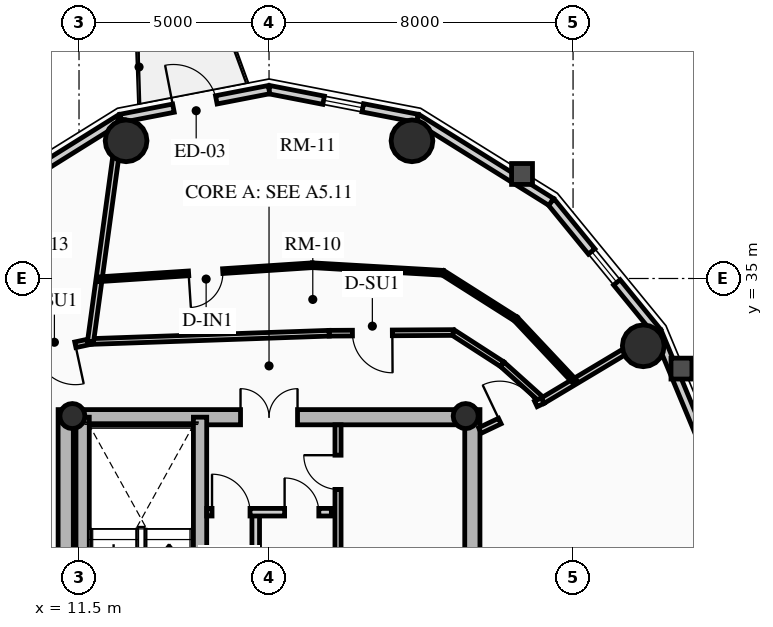
"""IFC4 building model, lengths in metres.
Left out: names, types, materials, properties, quantities, classifications, styles, units other than length and angle.
Written with IfcOpenShell. Run it as: python <this file> out.ifc"""

import sys

from ifc_helpers import new_model, si_unit, direction, frame, frame_2d, origin, origin_2d, place, context, subcontext, project, spatial, rectangle, circle, hollow_circle, extrude, source, transform, mapped, element, fill, save


model = new_model("IFC4")
c1 = context("Model", 3, precision=1e-05, world=origin(), true_north=direction((0.0, 1.0)))
c2 = subcontext(c1, "Body", "Model", "MODEL_VIEW")
j1 = project(units=[si_unit("LENGTHUNIT", "METRE"), si_unit("PLANEANGLEUNIT", "RADIAN")], contexts=[c1])
p1 = place(None, origin())
s1 = spatial("IfcSite", under=j1, at=p1, CompositionType="ELEMENT")
p2 = place(p1, origin())
s2 = spatial("IfcBuilding", under=s1, at=p2, CompositionType="ELEMENT")
p3 = place(p2, frame((0.0, 0.0, 217.03)))
s3 = spatial("IfcBuildingStorey", under=s2, at=p3, CompositionType="ELEMENT", Elevation=217.03)
for number, where, z_axis, x_axis in (
    (1, (11.15, 17.45, 0.0), (0.0, 0.0, 1.0), (0.0, 1.0, 0.0)),
    (2, (21.85, 17.45, 0.0), (0.0, 0.0, 1.0), (0.0, 1.0, 0.0)),
):
    element("IfcWall", number, at=place(p3, frame(where, z_axis=z_axis, x_axis=x_axis)), inside=s3, PredefinedType="SHEAR", context=c2, shape_type="SweptSolid", body=[
        extrude(rectangle(XDim=14.1, YDim=0.4, at=frame_2d((7.05, 0.0))), origin(), (0.0, 0.0, 1.0), 2.91),
    ])
p4 = place(p3, frame((11.15, 31.35, 0.0), z_axis=(0.0, 0.0, 1.0), x_axis=(1.0, 0.0, 0.0)))
e3 = element("IfcWall", 3, at=p4, inside=s3, PredefinedType="SHEAR", context=c2, shape_type="SweptSolid", body=[
    extrude(rectangle(XDim=10.7, YDim=0.4, at=frame_2d((5.35, 0.0))), origin(), (0.0, 0.0, 1.0), 2.91),
])
m1 = source(origin(), c2, "Body", "SweptSolid", [
    extrude(rectangle(XDim=1.5, YDim=2.02, at=frame_2d((0.75, 1.01))), frame((0.0, 0.21, 0.0), z_axis=(0.0, -1.0, 0.0), x_axis=(1.0, 0.0, 0.0)), (0.0, 0.0, 1.0), 0.42),
])
p5 = place(p4, frame((4.6, 0.0, 0.0)))
e4 = element("IfcOpeningElement", 4, at=p5, cuts=e3, PredefinedType="OPENING", context=c2, shape_type="MappedRepresentation", body=[
    mapped(m1, transform((0.0, 0.0, 0.0), x_axis=(1.0, 0.0, 0.0), y_axis=(0.0, 1.0, 0.0), z_axis=(0.0, 0.0, 1.0), scale=1.0)),
])
p6 = place(p3, frame((14.685, 17.65, 0.0), z_axis=(0.0, 0.0, 1.0), x_axis=(0.0, 1.0, 0.0)))
e5 = element("IfcWall", 5, at=p6, inside=s3, PredefinedType="SHEAR", context=c2, shape_type="SweptSolid", body=[
    extrude(rectangle(XDim=13.7, YDim=0.35, at=frame_2d((6.85, 0.0))), origin(), (0.0, 0.0, 1.0), 2.91),
])
m2 = source(origin(), c2, "Body", "SweptSolid", [
    extrude(rectangle(XDim=1.1, YDim=2.015, at=frame_2d((0.55, 1.007))), frame((0.0, 0.185, 0.0), z_axis=(0.0, -1.0, 0.0), x_axis=(1.0, 0.0, 0.0)), (0.0, 0.0, 1.0), 0.37),
])
p7 = place(p6, frame((4.85, 0.0, 0.0)))
e6 = element("IfcOpeningElement", 6, at=p7, cuts=e5, PredefinedType="OPENING", context=c2, shape_type="MappedRepresentation", body=[
    mapped(m2, transform((0.0, 0.0, 0.0), x_axis=(1.0, 0.0, 0.0), y_axis=(0.0, 1.0, 0.0), z_axis=(0.0, 0.0, 1.0), scale=1.0)),
])
p8 = place(p6, frame((0.625, 0.0, 0.0)))
e7 = element("IfcOpeningElement", 7, at=p8, cuts=e5, PredefinedType="OPENING", context=c2, shape_type="MappedRepresentation", body=[
    mapped(m2, transform((0.0, 0.0, 0.0), x_axis=(1.0, 0.0, 0.0), y_axis=(0.0, 1.0, 0.0), z_axis=(0.0, 0.0, 1.0), scale=1.0)),
])
p9 = place(p6, frame((2.625, 0.0, 0.0)))
e8 = element("IfcOpeningElement", 8, at=p9, cuts=e5, PredefinedType="OPENING", context=c2, shape_type="MappedRepresentation", body=[
    mapped(m2, transform((0.0, 0.0, 0.0), x_axis=(1.0, 0.0, 0.0), y_axis=(0.0, 1.0, 0.0), z_axis=(0.0, 0.0, 1.0), scale=1.0)),
])
m3 = source(origin(), c2, "Body", "SweptSolid", [
    extrude(rectangle(XDim=1.15, YDim=2.02, at=frame_2d((0.575, 1.01))), frame((0.0, 0.185, 0.0), z_axis=(0.0, -1.0, 0.0), x_axis=(1.0, 0.0, 0.0)), (0.0, 0.0, 1.0), 0.37),
])
p10 = place(p6, frame((7.27, 0.0, 0.0)))
e9 = element("IfcOpeningElement", 9, at=p10, cuts=e5, PredefinedType="OPENING", context=c2, shape_type="MappedRepresentation", body=[
    mapped(m3, transform((0.0, 0.0, 0.0), x_axis=(1.0, 0.0, 0.0), y_axis=(0.0, 1.0, 0.0), z_axis=(0.0, 0.0, 1.0), scale=1.0)),
])
p11 = place(p3, frame((11.595, 24.655, 0.0), z_axis=(0.0, 0.0, 1.0), x_axis=(0.0, 1.0, 0.0)))
e10 = element("IfcWall", 10, at=p11, inside=s3, PredefinedType="SHEAR", context=c2, shape_type="SweptSolid", body=[
    extrude(rectangle(XDim=6.695, YDim=0.35, at=frame_2d((3.348, 0.0))), origin(), (0.0, 0.0, 1.0), 2.91),
])
for number, where, z_axis, x_axis in (
    (11, (11.325, 31.38, 0.0), (0.0, 0.0, 1.0), (1.0, 0.0, 0.0)),
    (12, (21.675, 31.38, 0.0), (0.0, 0.0, 1.0), (1.0, 0.0, 0.0)),
):
    element("IfcColumn", number, at=place(p3, frame(where, z_axis=z_axis, x_axis=x_axis)), inside=s3, PredefinedType="COLUMN", context=c2, shape_type="SweptSolid", body=[
        extrude(hollow_circle(Radius=0.33, WallThickness=0.025, at=origin_2d()), origin(), (0.0, 0.0, 1.0), 2.91),
    ])
for number, where, z_axis, x_axis in (
    (13, (26.347, 33.229, 0.0), (0.0, 0.0, 1.0), (1.0, 0.0, 0.0)),
    (14, (20.261, 38.623, 0.0), (0.0, 0.0, 1.0), (1.0, 0.0, 0.0)),
    (15, (12.739, 38.623, 0.0), (0.0, 0.0, 1.0), (1.0, 0.0, 0.0)),
):
    element("IfcColumn", number, at=place(p3, frame(where, z_axis=z_axis, x_axis=x_axis)), inside=s3, PredefinedType="USERDEFINED", context=c2, shape_type="SweptSolid", body=[
        extrude(circle(Radius=0.55, at=origin_2d()), origin(), (0.0, 0.0, 1.0), 2.91),
    ])
p12 = place(p3, frame((26.718, 33.593, 0.0), z_axis=(0.0, 0.0, 1.0), x_axis=(0.384036305194, -0.923317993052, 0.0)))
e16 = element("IfcWall", 16, at=p12, inside=s3, PredefinedType="SOLIDWALL", context=c2, shape_type="SweptSolid", body=[
    extrude(rectangle(XDim=4.671, YDim=0.22, at=frame_2d((2.335, 0.0))), origin(), (0.0, 0.0, 1.0), 2.322),
])
p13 = place(p3, frame((23.924, 37.015, 0.0), z_axis=(0.0, 0.0, 1.0), x_axis=(0.632467166636, -0.774587169483, 0.0)))
e17 = element("IfcWall", 17, at=p13, inside=s3, PredefinedType="SOLIDWALL", context=c2, shape_type="SweptSolid", body=[
    extrude(rectangle(XDim=4.418, YDim=0.22, at=frame_2d((2.209, 0.0))), origin(), (0.0, 0.0, 1.0), 2.322),
])
m4 = source(origin(), c2, "Body", "SweptSolid", [
    extrude(rectangle(XDim=1.05, YDim=1.3, at=frame_2d((0.525, 0.65))), frame((0.0, 0.12, 0.0), z_axis=(0.0, -1.0, 0.0), x_axis=(1.0, 0.0, 0.0)), (0.0, 0.0, 1.0), 0.24),
])
p14 = place(p13, frame((1.684, 0.0, 0.65)))
e18 = element("IfcOpeningElement", 18, at=p14, cuts=e17, PredefinedType="OPENING", context=c2, shape_type="MappedRepresentation", body=[
    mapped(m4, transform((0.0, 0.0, 0.0), x_axis=(1.0, 0.0, 0.0), y_axis=(0.0, 1.0, 0.0), z_axis=(0.0, 0.0, 1.0), scale=1.0)),
])
p15 = place(p3, frame((20.403, 39.213, 0.0), z_axis=(0.0, 0.0, 1.0), x_axis=(0.848318713376, -0.529485939886, 0.0)))
e19 = element("IfcWall", 19, at=p15, inside=s3, PredefinedType="SOLIDWALL", context=c2, shape_type="SweptSolid", body=[
    extrude(rectangle(XDim=4.15, YDim=0.22, at=frame_2d((2.075, 0.0))), origin(), (0.0, 0.0, 1.0), 2.322),
])
p16 = place(p3, frame((16.5, 39.97, 0.0), z_axis=(0.0, 0.0, 1.0), x_axis=(0.981700307484, -0.190432419211, 0.0)))
e20 = element("IfcWall", 20, at=p16, inside=s3, PredefinedType="SOLIDWALL", context=c2, shape_type="SweptSolid", body=[
    extrude(rectangle(XDim=3.976, YDim=0.22, at=frame_2d((1.988, 0.0))), origin(), (0.0, 0.0, 1.0), 2.322),
])
p17 = place(p16, frame((1.463, 0.0, 0.65)))
e21 = element("IfcOpeningElement", 21, at=p17, cuts=e20, PredefinedType="OPENING", context=c2, shape_type="MappedRepresentation", body=[
    mapped(m4, transform((0.0, 0.0, 0.0), x_axis=(1.0, 0.0, 0.0), y_axis=(0.0, 1.0, 0.0), z_axis=(0.0, 0.0, 1.0), scale=1.0)),
])
p18 = place(p3, frame((12.597, 39.213, 0.0), z_axis=(0.0, 0.0, 1.0), x_axis=(0.981700307484, 0.190432419211, 0.0)))
e22 = element("IfcWall", 22, at=p18, inside=s3, PredefinedType="SOLIDWALL", context=c2, shape_type="SweptSolid", body=[
    extrude(rectangle(XDim=3.976, YDim=0.22, at=frame_2d((1.988, 0.0))), origin(), (0.0, 0.0, 1.0), 2.322),
])
m5 = source(origin(), c2, "Body", "SweptSolid", [
    extrude(rectangle(XDim=1.15, YDim=2.005, at=frame_2d((0.575, 1.002))), frame((0.0, 0.12, 0.0), z_axis=(0.0, -1.0, 0.0), x_axis=(1.0, 0.0, 0.0)), (0.0, 0.0, 1.0), 0.24),
])
p19 = place(p18, frame((1.413, 0.0, 0.0)))
e23 = element("IfcOpeningElement", 23, at=p19, cuts=e22, PredefinedType="OPENING", context=c2, shape_type="MappedRepresentation", body=[
    mapped(m5, transform((0.0, 0.0, 0.0), x_axis=(1.0, 0.0, 0.0), y_axis=(0.0, 1.0, 0.0), z_axis=(0.0, 0.0, 1.0), scale=1.0)),
])
p20 = place(p3, frame((9.076, 37.015, 0.0), z_axis=(0.0, 0.0, 1.0), x_axis=(0.848318713376, 0.529485939886, 0.0)))
e24 = element("IfcWall", 24, at=p20, inside=s3, PredefinedType="SOLIDWALL", context=c2, shape_type="SweptSolid", body=[
    extrude(rectangle(XDim=4.15, YDim=0.22, at=frame_2d((2.075, 0.0))), origin(), (0.0, 0.0, 1.0), 2.322),
])
p21 = place(p3, frame((16.15, 26.45, 0.0), z_axis=(0.0, 0.0, 1.0), x_axis=(0.0, 1.0, 0.0)))
e25 = element("IfcWall", 25, at=p21, inside=s3, PredefinedType="PARTITIONING", context=c2, shape_type="SweptSolid", body=[
    extrude(rectangle(XDim=2.4, YDim=0.2, at=frame_2d((1.2, 0.0))), origin(), (0.0, 0.0, 1.0), 2.685),
])
p22 = place(p3, frame((14.86, 28.85, 0.0), z_axis=(0.0, 0.0, 1.0), x_axis=(1.0, 0.0, 0.0)))
e26 = element("IfcWall", 26, at=p22, inside=s3, PredefinedType="PARTITIONING", context=c2, shape_type="SweptSolid", body=[
    extrude(rectangle(XDim=3.28, YDim=0.2, at=frame_2d((1.64, 0.0))), origin(), (0.0, 0.0, 1.0), 2.685),
])
m6 = source(origin(), c2, "Body", "SweptSolid", [
    extrude(rectangle(XDim=1.0, YDim=2.015, at=frame_2d((0.5, 1.007))), frame((0.0, 0.11, 0.0), z_axis=(0.0, -1.0, 0.0), x_axis=(1.0, 0.0, 0.0)), (0.0, 0.0, 1.0), 0.22),
])
p23 = place(p22, frame((0.14, 0.0, 0.0)))
e27 = element("IfcOpeningElement", 27, at=p23, cuts=e26, PredefinedType="OPENING", context=c2, shape_type="MappedRepresentation", body=[
    mapped(m6, transform((0.0, 0.0, 0.0), x_axis=(1.0, 0.0, 0.0), y_axis=(0.0, 1.0, 0.0), z_axis=(0.0, 0.0, 1.0), scale=1.0)),
])
m7 = source(origin(), c2, "Body", "SweptSolid", [
    extrude(rectangle(XDim=0.9, YDim=2.005, at=frame_2d((0.45, 1.002))), frame((0.0, 0.11, 0.0), z_axis=(0.0, -1.0, 0.0), x_axis=(1.0, 0.0, 0.0)), (0.0, 0.0, 1.0), 0.22),
])
p24 = place(p22, frame((2.05, 0.0, 0.0)))
e28 = element("IfcOpeningElement", 28, at=p24, cuts=e26, PredefinedType="OPENING", context=c2, shape_type="MappedRepresentation", body=[
    mapped(m7, transform((0.0, 0.0, 0.0), x_axis=(1.0, 0.0, 0.0), y_axis=(0.0, 1.0, 0.0), z_axis=(0.0, 0.0, 1.0), scale=1.0)),
])
p25 = place(p3, frame((18.315, 27.25, 0.0), z_axis=(0.0, 0.0, 1.0), x_axis=(0.0, 1.0, 0.0)))
e29 = element("IfcWall", 29, at=p25, inside=s3, PredefinedType="PARTITIONING", context=c2, shape_type="SweptSolid", body=[
    extrude(rectangle(XDim=3.9, YDim=0.16, at=frame_2d((1.95, 0.0))), origin(), (0.0, 0.0, 1.0), 2.685),
])
m8 = source(origin(), c2, "Body", "SweptSolid", [
    extrude(rectangle(XDim=0.9, YDim=2.005, at=frame_2d((0.45, 1.002))), frame((0.0, 0.09, 0.0), z_axis=(0.0, -1.0, 0.0), x_axis=(1.0, 0.0, 0.0)), (0.0, 0.0, 1.0), 0.18),
])
p26 = place(p25, frame((2.2, 0.0, 0.0)))
e30 = element("IfcOpeningElement", 30, at=p26, cuts=e29, PredefinedType="OPENING", context=c2, shape_type="MappedRepresentation", body=[
    mapped(m8, transform((0.0, 0.0, 0.0), x_axis=(1.0, 0.0, 0.0), y_axis=(0.0, 1.0, 0.0), z_axis=(0.0, 0.0, 1.0), scale=1.0)),
])
p27 = place(p3, frame((23.701, 31.786, 0.0), z_axis=(0.0, 0.0, 1.0), x_axis=(-0.743742806382, 0.668465883913, 0.0)))
e31 = element("IfcWall", 31, at=p27, inside=s3, PredefinedType="PARTITIONING", context=c2, shape_type="SweptSolid", body=[
    extrude(rectangle(XDim=1.434, YDim=0.15, at=frame_2d((0.717, 0.0))), origin(), (0.0, 0.0, 1.0), 2.322),
])
p28 = place(p3, frame((22.635, 32.744, 0.0), z_axis=(0.0, 0.0, 1.0), x_axis=(-0.840119270642, 0.542401706391, 0.0)))
e32 = element("IfcWall", 32, at=p28, inside=s3, PredefinedType="PARTITIONING", context=c2, shape_type="SweptSolid", body=[
    extrude(rectangle(XDim=1.538, YDim=0.15, at=frame_2d((0.769, 0.0))), origin(), (0.0, 0.0, 1.0), 2.255),
])
p29 = place(p3, frame((21.344, 33.578, 0.0), z_axis=(0.0, 0.0, 1.0), x_axis=(-0.999984243152, -0.005613684, 0.0)))
e33 = element("IfcWall", 33, at=p29, inside=s3, PredefinedType="PARTITIONING", context=c2, shape_type="SweptSolid", body=[
    extrude(rectangle(XDim=3.262, YDim=0.15, at=frame_2d((1.631, 0.0))), origin(), (0.0, 0.0, 1.0), 2.322),
])
m9 = source(origin(), c2, "Body", "SweptSolid", [
    extrude(rectangle(XDim=1.05, YDim=2.015, at=frame_2d((0.525, 1.007))), frame((0.0, 0.085, 0.0), z_axis=(0.0, -1.0, 0.0), x_axis=(1.0, 0.0, 0.0)), (0.0, 0.0, 1.0), 0.17),
])
p30 = place(p29, frame((1.599, 0.0, 0.0)))
e34 = element("IfcOpeningElement", 34, at=p30, cuts=e33, PredefinedType="OPENING", context=c2, shape_type="MappedRepresentation", body=[
    mapped(m9, transform((0.0, 0.0, 0.0), x_axis=(1.0, 0.0, 0.0), y_axis=(0.0, 1.0, 0.0), z_axis=(0.0, 0.0, 1.0), scale=1.0)),
])
p31 = place(p3, frame((18.082, 33.56, 0.0), z_axis=(0.0, 0.0, 1.0), x_axis=(-0.999399009709, -0.034664382185, 0.0)))
e35 = element("IfcWall", 35, at=p31, inside=s3, PredefinedType="PARTITIONING", context=c2, shape_type="SweptSolid", body=[
    extrude(rectangle(XDim=6.282, YDim=0.15, at=frame_2d((3.141, 0.0))), origin(), (0.0, 0.0, 1.0), 2.255),
])
p32 = place(p3, frame((11.803, 33.342, 0.0), z_axis=(0.0, 0.0, 1.0), x_axis=(-0.977750742783, -0.209770076483, 0.0)))
e36 = element("IfcWall", 36, at=p32, inside=s3, PredefinedType="PARTITIONING", context=c2, shape_type="SweptSolid", body=[
    extrude(rectangle(XDim=1.868, YDim=0.15, at=frame_2d((0.934, 0.0))), origin(), (0.0, 0.0, 1.0), 2.255),
])
p33 = place(p32, frame((0.409, 0.0, 0.0)))
e37 = element("IfcOpeningElement", 37, at=p33, cuts=e36, PredefinedType="OPENING", context=c2, shape_type="MappedRepresentation", body=[
    mapped(m9, transform((0.0, 0.0, 0.0), x_axis=(1.0, 0.0, 0.0), y_axis=(0.0, 1.0, 0.0), z_axis=(0.0, 0.0, 1.0), scale=1.0)),
])
p34 = place(p3, frame((23.701, 31.786, 0.0), z_axis=(0.0, 0.0, 1.0), x_axis=(0.858059206709, 0.513550774298, 0.0)))
e38 = element("IfcWall", 38, at=p34, inside=s3, PredefinedType="PARTITIONING", context=c2, shape_type="SweptSolid", body=[
    extrude(rectangle(XDim=3.497, YDim=0.16, at=frame_2d((1.748, 0.0))), origin(), (0.0, 0.0, 1.0), 2.322),
])
p35 = place(p3, frame((11.803, 33.342, 0.0), z_axis=(0.0, 0.0, 1.0), x_axis=(0.135452591041, 0.990783828885, 0.0)))
e39 = element("IfcWall", 39, at=p35, inside=s3, PredefinedType="PARTITIONING", context=c2, shape_type="SweptSolid", body=[
    extrude(rectangle(XDim=5.906, YDim=0.16, at=frame_2d((2.953, 0.0))), origin(), (0.0, 0.0, 1.0), 2.322),
])
p36 = place(p3, frame((22.05, 31.0, 0.0), z_axis=(0.0, 0.0, 1.0), x_axis=(0.903013459407, 0.429612257891, 0.0)))
e40 = element("IfcWall", 40, at=p36, inside=s3, PredefinedType="PARTITIONING", context=c2, shape_type="SweptSolid", body=[
    extrude(rectangle(XDim=1.829, YDim=0.16, at=frame_2d((0.914, 0.0))), origin(), (0.0, 0.0, 1.0), 2.255),
])
m10 = source(origin(), c2, "Body", "SweptSolid", [
    extrude(rectangle(XDim=1.05, YDim=2.015, at=frame_2d((0.525, 1.007))), frame((0.0, 0.09, 0.0), z_axis=(0.0, -1.0, 0.0), x_axis=(1.0, 0.0, 0.0)), (0.0, 0.0, 1.0), 0.18),
])
p37 = place(p36, frame((0.579, 0.0, 0.0)))
e41 = element("IfcOpeningElement", 41, at=p37, cuts=e40, PredefinedType="OPENING", context=c2, shape_type="MappedRepresentation", body=[
    mapped(m10, transform((0.0, 0.0, 0.0), x_axis=(1.0, 0.0, 0.0), y_axis=(0.0, 1.0, 0.0), z_axis=(0.0, 0.0, 1.0), scale=1.0)),
])
p38 = place(p3, frame((24.542, 32.288, 0.0), z_axis=(0.0, 0.0, 1.0), x_axis=(-0.68501091047, 0.72853280814, 0.0)))
e42 = element("IfcWall", 42, at=p38, inside=s3, PredefinedType="PARTITIONING", context=c2, shape_type="SweptSolid", body=[
    extrude(rectangle(XDim=2.261, YDim=0.125, at=frame_2d((1.13, 0.0))), origin(), (0.0, 0.0, 1.0), 2.322),
])
p39 = place(p3, frame((22.993, 33.935, 0.0), z_axis=(0.0, 0.0, 1.0), x_axis=(-0.844312558894, 0.535851008112, 0.0)))
e43 = element("IfcWall", 43, at=p39, inside=s3, PredefinedType="PARTITIONING", context=c2, shape_type="SweptSolid", body=[
    extrude(rectangle(XDim=2.268, YDim=0.125, at=frame_2d((1.134, 0.0))), origin(), (0.0, 0.0, 1.0), 2.255),
])
p40 = place(p3, frame((21.078, 35.15, 0.0), z_axis=(0.0, 0.0, 1.0), x_axis=(-0.99833900121, 0.057612834184, 0.0)))
e44 = element("IfcWall", 44, at=p40, inside=s3, PredefinedType="PARTITIONING", context=c2, shape_type="SweptSolid", body=[
    extrude(rectangle(XDim=3.445, YDim=0.125, at=frame_2d((1.723, 0.0))), origin(), (0.0, 0.0, 1.0), 2.322),
])
p41 = place(p3, frame((17.639, 35.349, 0.0), z_axis=(0.0, 0.0, 1.0), x_axis=(-0.997849042159, -0.065553711275, 0.0)))
e45 = element("IfcWall", 45, at=p41, inside=s3, PredefinedType="PARTITIONING", context=c2, shape_type="SweptSolid", body=[
    extrude(rectangle(XDim=5.624, YDim=0.125, at=frame_2d((2.812, 0.0))), origin(), (0.0, 0.0, 1.0), 2.255),
])
m11 = source(origin(), c2, "Body", "SweptSolid", [
    extrude(rectangle(XDim=0.9, YDim=2.005, at=frame_2d((0.45, 1.002))), frame((0.0, 0.073, 0.0), z_axis=(0.0, -1.0, 0.0), x_axis=(1.0, 0.0, 0.0)), (0.0, 0.0, 1.0), 0.145),
])
p42 = place(p41, frame((2.362, 0.0, 0.0)))
e46 = element("IfcOpeningElement", 46, at=p42, cuts=e45, PredefinedType="OPENING", context=c2, shape_type="MappedRepresentation", body=[
    mapped(m11, transform((0.0, 0.0, 0.0), x_axis=(1.0, 0.0, 0.0), y_axis=(0.0, 1.0, 0.0), z_axis=(0.0, 0.0, 1.0), scale=1.0)),
])
m12 = source(origin(), c2, "Body", "SweptSolid", [
    extrude(rectangle(XDim=1.05, YDim=1.3, at=frame_2d((0.525, 0.65))), frame((0.0, 0.03, 0.0), z_axis=(0.0, -1.0, 0.0), x_axis=(1.0, 0.0, 0.0)), (0.0, 0.0, 1.0), 0.06),
])
p43 = place(p14, origin())
e47 = element("IfcWindow", 47, at=p43, inside=s3, PartitioningType="SINGLE_PANEL", PredefinedType="WINDOW", context=c2, shape_type="MappedRepresentation", body=[
    mapped(m12, transform((0.0, 0.0, 0.0), x_axis=(1.0, 0.0, 0.0), y_axis=(0.0, 1.0, 0.0), z_axis=(0.0, 0.0, 1.0), scale=1.0)),
])
fill(e18, e47)
p44 = place(p17, origin())
e48 = element("IfcWindow", 48, at=p44, inside=s3, PartitioningType="SINGLE_PANEL", PredefinedType="WINDOW", context=c2, shape_type="MappedRepresentation", body=[
    mapped(m12, transform((0.0, 0.0, 0.0), x_axis=(1.0, 0.0, 0.0), y_axis=(0.0, 1.0, 0.0), z_axis=(0.0, 0.0, 1.0), scale=1.0)),
])
fill(e21, e48)
m13 = source(origin(), c2, "Body", "SweptSolid", [
    extrude(rectangle(XDim=1.15, YDim=2.005, at=frame_2d((0.575, 1.002))), frame((0.0, 0.025, 0.0), z_axis=(0.0, -1.0, 0.0), x_axis=(1.0, 0.0, 0.0)), (0.0, 0.0, 1.0), 0.05),
])
p45 = place(p19, origin())
e49 = element("IfcDoor", 49, at=p45, inside=s3, OperationType="SINGLE_SWING_LEFT", PredefinedType="DOOR", context=c2, shape_type="MappedRepresentation", body=[
    mapped(m13, transform((0.0, 0.0, 0.0), x_axis=(1.0, 0.0, 0.0), y_axis=(0.0, 1.0, 0.0), z_axis=(0.0, 0.0, 1.0), scale=1.0)),
])
fill(e23, e49)
m14 = source(origin(), c2, "Body", "SweptSolid", [
    extrude(rectangle(XDim=1.5, YDim=2.02, at=frame_2d((0.75, 1.01))), frame((0.0, 0.025, 0.0), z_axis=(0.0, -1.0, 0.0), x_axis=(1.0, 0.0, 0.0)), (0.0, 0.0, 1.0), 0.05),
])
p46 = place(p5, origin())
e50 = element("IfcDoor", 50, at=p46, inside=s3, OperationType="DOUBLE_DOOR_SINGLE_SWING", PredefinedType="DOOR", context=c2, shape_type="MappedRepresentation", body=[
    mapped(m14, transform((0.0, 0.0, 0.0), x_axis=(1.0, 0.0, 0.0), y_axis=(0.0, 1.0, 0.0), z_axis=(0.0, 0.0, 1.0), scale=1.0)),
])
fill(e4, e50)
m15 = source(origin(), c2, "Body", "SweptSolid", [
    extrude(rectangle(XDim=1.0, YDim=2.015, at=frame_2d((0.5, 1.007))), frame((0.0, 0.025, 0.0), z_axis=(0.0, -1.0, 0.0), x_axis=(1.0, 0.0, 0.0)), (0.0, 0.0, 1.0), 0.05),
])
p47 = place(p23, origin())
e51 = element("IfcDoor", 51, at=p47, inside=s3, OperationType="SINGLE_SWING_LEFT", PredefinedType="DOOR", context=c2, shape_type="MappedRepresentation", body=[
    mapped(m15, transform((0.0, 0.0, 0.0), x_axis=(1.0, 0.0, 0.0), y_axis=(0.0, 1.0, 0.0), z_axis=(0.0, 0.0, 1.0), scale=1.0)),
])
fill(e27, e51)
m16 = source(origin(), c2, "Body", "SweptSolid", [
    extrude(rectangle(XDim=0.9, YDim=2.005, at=frame_2d((0.45, 1.002))), frame((0.0, 0.025, 0.0), z_axis=(0.0, -1.0, 0.0), x_axis=(1.0, 0.0, 0.0)), (0.0, 0.0, 1.0), 0.05),
])
p48 = place(p24, origin())
e52 = element("IfcDoor", 52, at=p48, inside=s3, OperationType="SINGLE_SWING_LEFT", PredefinedType="DOOR", context=c2, shape_type="MappedRepresentation", body=[
    mapped(m16, transform((0.0, 0.0, 0.0), x_axis=(1.0, 0.0, 0.0), y_axis=(0.0, 1.0, 0.0), z_axis=(0.0, 0.0, 1.0), scale=1.0)),
])
fill(e28, e52)
p49 = place(p26, origin())
e53 = element("IfcDoor", 53, at=p49, inside=s3, OperationType="SINGLE_SWING_RIGHT", PredefinedType="DOOR", context=c2, shape_type="MappedRepresentation", body=[
    mapped(m16, transform((0.0, 0.0, 0.0), x_axis=(1.0, 0.0, 0.0), y_axis=(0.0, 1.0, 0.0), z_axis=(0.0, 0.0, 1.0), scale=1.0)),
])
fill(e30, e53)
m17 = source(origin(), c2, "Body", "SweptSolid", [
    extrude(rectangle(XDim=1.05, YDim=2.015, at=frame_2d((0.525, 1.007))), frame((0.0, 0.025, 0.0), z_axis=(0.0, -1.0, 0.0), x_axis=(1.0, 0.0, 0.0)), (0.0, 0.0, 1.0), 0.05),
])
p50 = place(p37, origin())
e54 = element("IfcDoor", 54, at=p50, inside=s3, OperationType="SINGLE_SWING_LEFT", PredefinedType="DOOR", context=c2, shape_type="MappedRepresentation", body=[
    mapped(m17, transform((0.0, 0.0, 0.0), x_axis=(1.0, 0.0, 0.0), y_axis=(0.0, 1.0, 0.0), z_axis=(0.0, 0.0, 1.0), scale=1.0)),
])
fill(e41, e54)
p51 = place(p30, origin())
e55 = element("IfcDoor", 55, at=p51, inside=s3, OperationType="SINGLE_SWING_LEFT", PredefinedType="DOOR", context=c2, shape_type="MappedRepresentation", body=[
    mapped(m17, transform((0.0, 0.0, 0.0), x_axis=(1.0, 0.0, 0.0), y_axis=(0.0, 1.0, 0.0), z_axis=(0.0, 0.0, 1.0), scale=1.0)),
])
fill(e34, e55)
p52 = place(p42, origin())
e56 = element("IfcDoor", 56, at=p52, inside=s3, OperationType="SINGLE_SWING_RIGHT", PredefinedType="DOOR", context=c2, shape_type="MappedRepresentation", body=[
    mapped(m16, transform((0.0, 0.0, 0.0), x_axis=(1.0, 0.0, 0.0), y_axis=(0.0, 1.0, 0.0), z_axis=(0.0, 0.0, 1.0), scale=1.0)),
])
fill(e46, e56)
p53 = place(p33, origin())
e57 = element("IfcDoor", 57, at=p53, inside=s3, OperationType="SINGLE_SWING_LEFT", PredefinedType="DOOR", context=c2, shape_type="MappedRepresentation", body=[
    mapped(m17, transform((0.0, 0.0, 0.0), x_axis=(1.0, 0.0, 0.0), y_axis=(0.0, 1.0, 0.0), z_axis=(0.0, 0.0, 1.0), scale=1.0)),
])
fill(e37, e57)
save(model, sys.argv[1])
